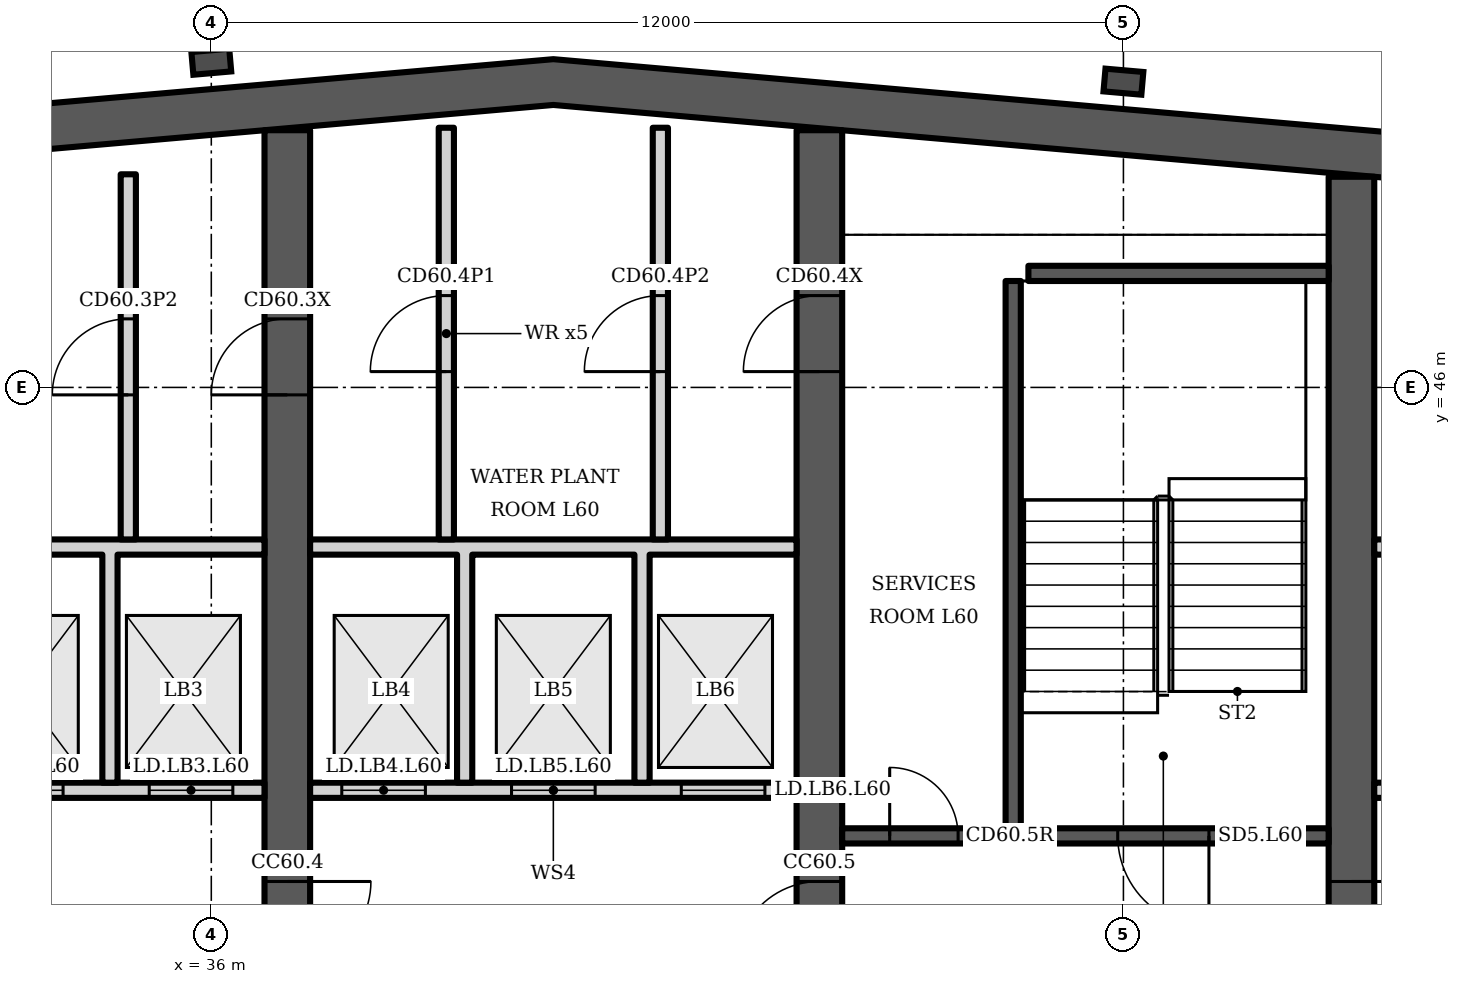
"""IFC4 building model, lengths in metres.
Left out: names, types, materials, properties, quantities, classifications, styles, units other than length and angle.
Written with IfcOpenShell. Run it as: python <this file> out.ifc"""

import sys

from ifc_helpers import new_model, si_unit, direction, frame, frame_2d, origin, origin_2d, place, context, subcontext, project, spatial, polyline, rectangle, i_section, outline, extrude, element, fill, save


model = new_model("IFC4")
c1 = context("Model", 3, precision=1e-05, world=origin(), true_north=direction((0.0, 1.0)))
c2 = subcontext(c1, "Body", "Model", "MODEL_VIEW")
j1 = project(units=[si_unit("LENGTHUNIT", "METRE"), si_unit("PLANEANGLEUNIT", "RADIAN")], contexts=[c1])
p1 = place(None, origin())
s1 = spatial("IfcSite", under=j1, at=p1, CompositionType="ELEMENT")
p2 = place(p1, origin())
s2 = spatial("IfcBuilding", under=s1, at=p2, CompositionType="ELEMENT")
p3 = place(p2, frame((0.0, 0.0, 239.5)))
s3 = spatial("IfcBuildingStorey", under=s2, at=p3, CompositionType="ELEMENT", Elevation=239.5)
p4 = place(p3, origin())
e1 = element("IfcWall", 1, at=p4, inside=s3, PredefinedType="SHEAR", context=c2, shape_type="SweptSolid", body=[
    extrude(outline(polyline([(23.0, 48.185), (40.5, 49.716), (58.0, 48.185), (58.0, 48.787), (40.5, 50.318), (23.0, 48.787), (23.0, 48.185)])), origin(), (0.0, 0.0, 1.0), 3.6),
])
p5 = place(p3, frame((37.0, 34.6, 0.0), z_axis=(0.0, 0.0, 1.0), x_axis=(0.0, 1.0, 0.0)))
e2 = element("IfcWall", 2, at=p5, inside=s3, PredefinedType="SHEAR", context=c2, shape_type="SweptSolid", body=[
    extrude(rectangle(XDim=14.784, YDim=0.6, at=frame_2d((7.392, 0.0))), origin(), (0.0, 0.0, 1.0), 3.6),
])
p6 = place(p5, frame((11.302, 0.0, 0.0)))
e3 = element("IfcOpeningElement", 3, at=p6, cuts=e2, PredefinedType="OPENING", context=c2, shape_type="SweptSolid", body=[
    extrude(rectangle(XDim=1.0, YDim=2.1, at=frame_2d((0.5, 1.05))), frame((0.0, 0.31, 0.0), z_axis=(0.0, -1.0, 0.0), x_axis=(1.0, 0.0, 0.0)), (0.0, 0.0, 1.0), 0.62),
])
p7 = place(p5, frame((3.8, 0.0, 0.0)))
e4 = element("IfcOpeningElement", 4, at=p7, cuts=e2, PredefinedType="OPENING", context=c2, shape_type="SweptSolid", body=[
    extrude(rectangle(XDim=1.1, YDim=2.1, at=frame_2d((0.55, 1.05))), frame((0.0, 0.31, 0.0), z_axis=(0.0, -1.0, 0.0), x_axis=(1.0, 0.0, 0.0)), (0.0, 0.0, 1.0), 0.62),
])
p8 = place(p3, frame((44.0, 34.6, 0.0), z_axis=(0.0, 0.0, 1.0), x_axis=(0.0, 1.0, 0.0)))
e5 = element("IfcWall", 5, at=p8, inside=s3, PredefinedType="SHEAR", context=c2, shape_type="SweptSolid", body=[
    extrude(rectangle(XDim=14.784, YDim=0.6, at=frame_2d((7.392, 0.0))), origin(), (0.0, 0.0, 1.0), 3.6),
])
p9 = place(p8, frame((11.608, 0.0, 0.0)))
e6 = element("IfcOpeningElement", 6, at=p9, cuts=e5, PredefinedType="OPENING", context=c2, shape_type="SweptSolid", body=[
    extrude(rectangle(XDim=1.0, YDim=2.1, at=frame_2d((0.5, 1.05))), frame((0.0, 0.31, 0.0), z_axis=(0.0, -1.0, 0.0), x_axis=(1.0, 0.0, 0.0)), (0.0, 0.0, 1.0), 0.62),
])
p10 = place(p8, frame((3.8, 0.0, 0.0)))
e7 = element("IfcOpeningElement", 7, at=p10, cuts=e5, PredefinedType="OPENING", context=c2, shape_type="SweptSolid", body=[
    extrude(rectangle(XDim=1.1, YDim=2.1, at=frame_2d((0.55, 1.05))), frame((0.0, 0.31, 0.0), z_axis=(0.0, -1.0, 0.0), x_axis=(1.0, 0.0, 0.0)), (0.0, 0.0, 1.0), 0.62),
])
p11 = place(p3, frame((51.0, 34.6, 0.0), z_axis=(0.0, 0.0, 1.0), x_axis=(0.0, 1.0, 0.0)))
e8 = element("IfcWall", 8, at=p11, inside=s3, PredefinedType="SHEAR", context=c2, shape_type="SweptSolid", body=[
    extrude(rectangle(XDim=14.171, YDim=0.6, at=frame_2d((7.085, 0.0))), origin(), (0.0, 0.0, 1.0), 3.6),
])
p12 = place(p11, frame((3.8, 0.0, 0.0)))
e9 = element("IfcOpeningElement", 9, at=p12, cuts=e8, PredefinedType="OPENING", context=c2, shape_type="SweptSolid", body=[
    extrude(rectangle(XDim=1.1, YDim=2.1, at=frame_2d((0.55, 1.05))), frame((0.0, 0.31, 0.0), z_axis=(0.0, -1.0, 0.0), x_axis=(1.0, 0.0, 0.0)), (0.0, 0.0, 1.0), 0.62),
])
for number, where, z_axis, x_axis in (
    (10, (36.0, 50.285, 0.0), (0.0, 0.0, 1.0), (-0.087, 0.996, 0.0)),
    (11, (48.0, 50.022, 0.0), (0.0, 0.0, 1.0), (0.087, 0.996, 0.0)),
):
    element("IfcColumn", number, at=place(p3, frame(where, z_axis=z_axis, x_axis=x_axis)), inside=s3, PredefinedType="COLUMN", context=c2, shape_type="SweptSolid", body=[
        extrude(i_section(OverallWidth=0.3, OverallDepth=0.5, WebThickness=0.014, FlangeThickness=0.028, FilletRadius=0.027, at=origin_2d()), origin(), (0.0, 0.0, 1.0), 3.6),
    ])
p13 = place(p3, frame((30.3, 40.7, 0.0), z_axis=(0.0, 0.0, 1.0), x_axis=(1.0, 0.0, 0.0)))
e12 = element("IfcWall", 12, at=p13, inside=s3, PredefinedType="PARTITIONING", context=c2, shape_type="SweptSolid", body=[
    extrude(rectangle(XDim=6.4, YDim=0.2, at=frame_2d((3.2, 0.0))), origin(), (0.0, 0.0, 1.0), 3.2),
])
p14 = place(p13, frame((0.417, 0.0, 0.0)))
e13 = element("IfcOpeningElement", 13, at=p14, cuts=e12, PredefinedType="OPENING", context=c2, shape_type="SweptSolid", body=[
    extrude(rectangle(XDim=1.1, YDim=2.1, at=frame_2d((0.55, 1.05))), frame((0.0, 0.11, 0.0), z_axis=(0.0, -1.0, 0.0), x_axis=(1.0, 0.0, 0.0)), (0.0, 0.0, 1.0), 0.22),
])
p15 = place(p13, frame((2.65, 0.0, 0.0)))
e14 = element("IfcOpeningElement", 14, at=p15, cuts=e12, PredefinedType="OPENING", context=c2, shape_type="SweptSolid", body=[
    extrude(rectangle(XDim=1.1, YDim=2.1, at=frame_2d((0.55, 1.05))), frame((0.0, 0.11, 0.0), z_axis=(0.0, -1.0, 0.0), x_axis=(1.0, 0.0, 0.0)), (0.0, 0.0, 1.0), 0.22),
])
p16 = place(p13, frame((4.883, 0.0, 0.0)))
e15 = element("IfcOpeningElement", 15, at=p16, cuts=e12, PredefinedType="OPENING", context=c2, shape_type="SweptSolid", body=[
    extrude(rectangle(XDim=1.1, YDim=2.1, at=frame_2d((0.55, 1.05))), frame((0.0, 0.11, 0.0), z_axis=(0.0, -1.0, 0.0), x_axis=(1.0, 0.0, 0.0)), (0.0, 0.0, 1.0), 0.22),
])
p17 = place(p3, frame((0.0, 0.0, -0.0)))
e16 = element("IfcWall", 16, at=p17, inside=s3, PredefinedType="PARTITIONING", context=c2, shape_type="SweptSolid", body=[
    extrude(outline(polyline([(32.433, 40.8), (32.233, 40.8), (32.233, 43.8), (30.3, 43.8), (30.3, 44.0), (36.7, 44.0), (36.7, 43.8), (34.767, 43.8), (34.767, 40.8), (34.567, 40.8), (34.567, 43.8), (32.433, 43.8), (32.433, 40.8)])), origin(), (0.0, 0.0, 1.0), 3.2),
])
p18 = place(p3, frame((34.908, 44.0, 0.0), z_axis=(0.0, 0.0, 1.0), x_axis=(0.0, 1.0, 0.0)))
e17 = element("IfcWall", 17, at=p18, inside=s3, PredefinedType="PARTITIONING", context=c2, shape_type="SweptSolid", body=[
    extrude(rectangle(XDim=4.804, YDim=0.2, at=frame_2d((2.402, 0.0))), origin(), (0.0, 0.0, 1.0), 3.2),
])
p19 = place(p18, frame((1.902, 0.0, 0.0)))
e18 = element("IfcOpeningElement", 18, at=p19, cuts=e17, PredefinedType="OPENING", context=c2, shape_type="SweptSolid", body=[
    extrude(rectangle(XDim=1.0, YDim=2.1, at=frame_2d((0.5, 1.05))), frame((0.0, 0.11, 0.0), z_axis=(0.0, -1.0, 0.0), x_axis=(1.0, 0.0, 0.0)), (0.0, 0.0, 1.0), 0.22),
])
p20 = place(p3, frame((37.3, 40.7, 0.0), z_axis=(0.0, 0.0, 1.0), x_axis=(1.0, 0.0, 0.0)))
e19 = element("IfcWall", 19, at=p20, inside=s3, PredefinedType="PARTITIONING", context=c2, shape_type="SweptSolid", body=[
    extrude(rectangle(XDim=6.4, YDim=0.2, at=frame_2d((3.2, 0.0))), origin(), (0.0, 0.0, 1.0), 3.2),
])
p21 = place(p20, frame((0.417, 0.0, 0.0)))
e20 = element("IfcOpeningElement", 20, at=p21, cuts=e19, PredefinedType="OPENING", context=c2, shape_type="SweptSolid", body=[
    extrude(rectangle(XDim=1.1, YDim=2.1, at=frame_2d((0.55, 1.05))), frame((0.0, 0.11, 0.0), z_axis=(0.0, -1.0, 0.0), x_axis=(1.0, 0.0, 0.0)), (0.0, 0.0, 1.0), 0.22),
])
p22 = place(p20, frame((2.65, 0.0, 0.0)))
e21 = element("IfcOpeningElement", 21, at=p22, cuts=e19, PredefinedType="OPENING", context=c2, shape_type="SweptSolid", body=[
    extrude(rectangle(XDim=1.1, YDim=2.1, at=frame_2d((0.55, 1.05))), frame((0.0, 0.11, 0.0), z_axis=(0.0, -1.0, 0.0), x_axis=(1.0, 0.0, 0.0)), (0.0, 0.0, 1.0), 0.22),
])
p23 = place(p20, frame((4.883, 0.0, 0.0)))
e22 = element("IfcOpeningElement", 22, at=p23, cuts=e19, PredefinedType="OPENING", context=c2, shape_type="SweptSolid", body=[
    extrude(rectangle(XDim=1.1, YDim=2.1, at=frame_2d((0.55, 1.05))), frame((0.0, 0.11, 0.0), z_axis=(0.0, -1.0, 0.0), x_axis=(1.0, 0.0, 0.0)), (0.0, 0.0, 1.0), 0.22),
])
p24 = place(p3, frame((0.0, 0.0, -0.0)))
e23 = element("IfcWall", 23, at=p24, inside=s3, PredefinedType="PARTITIONING", context=c2, shape_type="SweptSolid", body=[
    extrude(outline(polyline([(39.433, 40.8), (39.233, 40.8), (39.233, 43.8), (37.3, 43.8), (37.3, 44.0), (43.7, 44.0), (43.7, 43.8), (41.767, 43.8), (41.767, 40.8), (41.567, 40.8), (41.567, 43.8), (39.433, 43.8), (39.433, 40.8)])), origin(), (0.0, 0.0, 1.0), 3.2),
])
p25 = place(p3, frame((39.092, 44.0, 0.0), z_axis=(0.0, 0.0, 1.0), x_axis=(0.0, 1.0, 0.0)))
e24 = element("IfcWall", 24, at=p25, inside=s3, PredefinedType="PARTITIONING", context=c2, shape_type="SweptSolid", body=[
    extrude(rectangle(XDim=5.416, YDim=0.2, at=frame_2d((2.708, 0.0))), origin(), (0.0, 0.0, 1.0), 3.2),
])
p26 = place(p25, frame((2.208, 0.0, 0.0)))
e25 = element("IfcOpeningElement", 25, at=p26, cuts=e24, PredefinedType="OPENING", context=c2, shape_type="SweptSolid", body=[
    extrude(rectangle(XDim=1.0, YDim=2.1, at=frame_2d((0.5, 1.05))), frame((0.0, 0.11, 0.0), z_axis=(0.0, -1.0, 0.0), x_axis=(1.0, 0.0, 0.0)), (0.0, 0.0, 1.0), 0.22),
])
p27 = place(p3, frame((41.908, 44.0, 0.0), z_axis=(0.0, 0.0, 1.0), x_axis=(0.0, 1.0, 0.0)))
e26 = element("IfcWall", 26, at=p27, inside=s3, PredefinedType="PARTITIONING", context=c2, shape_type="SweptSolid", body=[
    extrude(rectangle(XDim=5.416, YDim=0.2, at=frame_2d((2.708, 0.0))), origin(), (0.0, 0.0, 1.0), 3.2),
])
p28 = place(p27, frame((2.208, 0.0, 0.0)))
e27 = element("IfcOpeningElement", 27, at=p28, cuts=e26, PredefinedType="OPENING", context=c2, shape_type="SweptSolid", body=[
    extrude(rectangle(XDim=1.0, YDim=2.1, at=frame_2d((0.5, 1.05))), frame((0.0, 0.11, 0.0), z_axis=(0.0, -1.0, 0.0), x_axis=(1.0, 0.0, 0.0)), (0.0, 0.0, 1.0), 0.22),
])
p29 = place(p3, frame((44.3, 40.1, 0.0), z_axis=(0.0, 0.0, 1.0), x_axis=(1.0, 0.0, 0.0)))
e28 = element("IfcWall", 28, at=p29, inside=s3, PredefinedType="SHEAR", context=c2, shape_type="SweptSolid", body=[
    extrude(rectangle(XDim=6.4, YDim=0.2, at=frame_2d((3.2, 0.0))), origin(), (0.0, 0.0, 1.0), 3.2),
])
p30 = place(p29, frame((3.625, 0.0, 0.0)))
e29 = element("IfcOpeningElement", 29, at=p30, cuts=e28, PredefinedType="OPENING", context=c2, shape_type="SweptSolid", body=[
    extrude(rectangle(XDim=1.2, YDim=2.1, at=frame_2d((0.6, 1.05))), frame((0.0, 0.11, 0.0), z_axis=(0.0, -1.0, 0.0), x_axis=(1.0, 0.0, 0.0)), (0.0, 0.0, 1.0), 0.22),
])
p31 = place(p29, frame((0.625, 0.0, 0.0)))
e30 = element("IfcOpeningElement", 30, at=p31, cuts=e28, PredefinedType="OPENING", context=c2, shape_type="SweptSolid", body=[
    extrude(rectangle(XDim=0.9, YDim=2.1, at=frame_2d((0.45, 1.05))), frame((0.0, 0.11, 0.0), z_axis=(0.0, -1.0, 0.0), x_axis=(1.0, 0.0, 0.0)), (0.0, 0.0, 1.0), 0.22),
])
p32 = place(p3, frame((46.55, 40.2, 0.0), z_axis=(0.0, 0.0, 1.0), x_axis=(0.0, 1.0, 0.0)))
e31 = element("IfcWall", 31, at=p32, inside=s3, PredefinedType="SHEAR", context=c2, shape_type="SweptSolid", body=[
    extrude(rectangle(XDim=7.2, YDim=0.2, at=frame_2d((3.6, 0.0))), origin(), (0.0, 0.0, 1.0), 3.2),
])
p33 = place(p3, frame((46.75, 47.5, 0.0), z_axis=(0.0, 0.0, 1.0), x_axis=(1.0, 0.0, 0.0)))
e32 = element("IfcWall", 32, at=p33, inside=s3, PredefinedType="SHEAR", context=c2, shape_type="SweptSolid", body=[
    extrude(rectangle(XDim=3.95, YDim=0.2, at=frame_2d((1.975, 0.0))), origin(), (0.0, 0.0, 1.0), 3.2),
])
p34 = place(p3, frame((51.3, 40.7, 0.0), z_axis=(0.0, 0.0, 1.0), x_axis=(1.0, 0.0, 0.0)))
e33 = element("IfcWall", 33, at=p34, inside=s3, PredefinedType="PARTITIONING", context=c2, shape_type="SweptSolid", body=[
    extrude(rectangle(XDim=6.1, YDim=0.2, at=frame_2d((3.05, 0.0))), origin(), (0.0, 0.0, 1.0), 3.2),
])
p35 = place(p34, frame((0.417, 0.0, 0.0)))
e34 = element("IfcOpeningElement", 34, at=p35, cuts=e33, PredefinedType="OPENING", context=c2, shape_type="SweptSolid", body=[
    extrude(rectangle(XDim=1.1, YDim=2.1, at=frame_2d((0.55, 1.05))), frame((0.0, 0.11, 0.0), z_axis=(0.0, -1.0, 0.0), x_axis=(1.0, 0.0, 0.0)), (0.0, 0.0, 1.0), 0.22),
])
p36 = place(p34, frame((3.617, 0.0, 0.0)))
e35 = element("IfcOpeningElement", 35, at=p36, cuts=e33, PredefinedType="OPENING", context=c2, shape_type="SweptSolid", body=[
    extrude(rectangle(XDim=1.0, YDim=2.1, at=frame_2d((0.5, 1.05))), frame((0.0, 0.11, 0.0), z_axis=(0.0, -1.0, 0.0), x_axis=(1.0, 0.0, 0.0)), (0.0, 0.0, 1.0), 0.22),
])
p37 = place(p3, frame((51.3, 43.9, 0.0), z_axis=(0.0, 0.0, 1.0), x_axis=(1.0, 0.0, 0.0)))
e36 = element("IfcWall", 36, at=p37, inside=s3, PredefinedType="PARTITIONING", context=c2, shape_type="SweptSolid", body=[
    extrude(rectangle(XDim=6.1, YDim=0.2, at=frame_2d((3.05, 0.0))), origin(), (0.0, 0.0, 1.0), 3.2),
])
p38 = place(p37, frame((2.817, 0.0, 0.0)))
e37 = element("IfcOpeningElement", 37, at=p38, cuts=e36, PredefinedType="OPENING", context=c2, shape_type="SweptSolid", body=[
    extrude(rectangle(XDim=1.0, YDim=2.1, at=frame_2d((0.5, 1.05))), frame((0.0, 0.11, 0.0), z_axis=(0.0, -1.0, 0.0), x_axis=(1.0, 0.0, 0.0)), (0.0, 0.0, 1.0), 0.22),
])
p39 = place(p37, frame((4.8, 0.0, 0.0)))
e38 = element("IfcOpeningElement", 38, at=p39, cuts=e36, PredefinedType="OPENING", context=c2, shape_type="SweptSolid", body=[
    extrude(rectangle(XDim=1.0, YDim=2.1, at=frame_2d((0.5, 1.05))), frame((0.0, 0.11, 0.0), z_axis=(0.0, -1.0, 0.0), x_axis=(1.0, 0.0, 0.0)), (0.0, 0.0, 1.0), 0.22),
])
p40 = place(p15, origin())
e39 = element("IfcDoor", 39, at=p40, inside=s3, OperationType="DOUBLE_DOOR_SLIDING", PredefinedType="DOOR", context=c2, shape_type="SweptSolid", body=[
    extrude(rectangle(XDim=1.1, YDim=2.1, at=frame_2d((0.55, 1.05))), frame((0.0, 0.025, 0.0), z_axis=(0.0, -1.0, 0.0), x_axis=(1.0, 0.0, 0.0)), (0.0, 0.0, 1.0), 0.05),
])
fill(e14, e39)
p41 = place(p16, origin())
e40 = element("IfcDoor", 40, at=p41, inside=s3, OperationType="DOUBLE_DOOR_SLIDING", PredefinedType="DOOR", context=c2, shape_type="SweptSolid", body=[
    extrude(rectangle(XDim=1.1, YDim=2.1, at=frame_2d((0.55, 1.05))), frame((0.0, 0.025, 0.0), z_axis=(0.0, -1.0, 0.0), x_axis=(1.0, 0.0, 0.0)), (0.0, 0.0, 1.0), 0.05),
])
fill(e15, e40)
p42 = place(p19, origin())
e41 = element("IfcDoor", 41, at=p42, inside=s3, OperationType="SINGLE_SWING_LEFT", PredefinedType="DOOR", context=c2, shape_type="SweptSolid", body=[
    extrude(rectangle(XDim=1.0, YDim=2.1, at=frame_2d((0.5, 1.05))), frame((0.0, 0.025, 0.0), z_axis=(0.0, -1.0, 0.0), x_axis=(1.0, 0.0, 0.0)), (0.0, 0.0, 1.0), 0.05),
])
fill(e18, e41)
p43 = place(p6, origin())
e42 = element("IfcDoor", 42, at=p43, inside=s3, OperationType="SINGLE_SWING_LEFT", PredefinedType="DOOR", context=c2, shape_type="SweptSolid", body=[
    extrude(rectangle(XDim=1.0, YDim=2.1, at=frame_2d((0.5, 1.05))), frame((0.0, 0.025, 0.0), z_axis=(0.0, -1.0, 0.0), x_axis=(1.0, 0.0, 0.0)), (0.0, 0.0, 1.0), 0.05),
])
fill(e3, e42)
p44 = place(p21, origin())
e43 = element("IfcDoor", 43, at=p44, inside=s3, OperationType="DOUBLE_DOOR_SLIDING", PredefinedType="DOOR", context=c2, shape_type="SweptSolid", body=[
    extrude(rectangle(XDim=1.1, YDim=2.1, at=frame_2d((0.55, 1.05))), frame((0.0, 0.025, 0.0), z_axis=(0.0, -1.0, 0.0), x_axis=(1.0, 0.0, 0.0)), (0.0, 0.0, 1.0), 0.05),
])
fill(e20, e43)
p45 = place(p22, origin())
e44 = element("IfcDoor", 44, at=p45, inside=s3, OperationType="DOUBLE_DOOR_SLIDING", PredefinedType="DOOR", context=c2, shape_type="SweptSolid", body=[
    extrude(rectangle(XDim=1.1, YDim=2.1, at=frame_2d((0.55, 1.05))), frame((0.0, 0.025, 0.0), z_axis=(0.0, -1.0, 0.0), x_axis=(1.0, 0.0, 0.0)), (0.0, 0.0, 1.0), 0.05),
])
fill(e21, e44)
p46 = place(p23, origin())
e45 = element("IfcDoor", 45, at=p46, inside=s3, OperationType="DOUBLE_DOOR_SLIDING", PredefinedType="DOOR", context=c2, shape_type="SweptSolid", body=[
    extrude(rectangle(XDim=1.1, YDim=2.1, at=frame_2d((0.55, 1.05))), frame((0.0, 0.025, 0.0), z_axis=(0.0, -1.0, 0.0), x_axis=(1.0, 0.0, 0.0)), (0.0, 0.0, 1.0), 0.05),
])
fill(e22, e45)
p47 = place(p26, origin())
e46 = element("IfcDoor", 46, at=p47, inside=s3, OperationType="SINGLE_SWING_LEFT", PredefinedType="DOOR", context=c2, shape_type="SweptSolid", body=[
    extrude(rectangle(XDim=1.0, YDim=2.1, at=frame_2d((0.5, 1.05))), frame((0.0, 0.025, 0.0), z_axis=(0.0, -1.0, 0.0), x_axis=(1.0, 0.0, 0.0)), (0.0, 0.0, 1.0), 0.05),
])
fill(e25, e46)
p48 = place(p28, origin())
e47 = element("IfcDoor", 47, at=p48, inside=s3, OperationType="SINGLE_SWING_LEFT", PredefinedType="DOOR", context=c2, shape_type="SweptSolid", body=[
    extrude(rectangle(XDim=1.0, YDim=2.1, at=frame_2d((0.5, 1.05))), frame((0.0, 0.025, 0.0), z_axis=(0.0, -1.0, 0.0), x_axis=(1.0, 0.0, 0.0)), (0.0, 0.0, 1.0), 0.05),
])
fill(e27, e47)
p49 = place(p9, origin())
e48 = element("IfcDoor", 48, at=p49, inside=s3, OperationType="SINGLE_SWING_LEFT", PredefinedType="DOOR", context=c2, shape_type="SweptSolid", body=[
    extrude(rectangle(XDim=1.0, YDim=2.1, at=frame_2d((0.5, 1.05))), frame((0.0, 0.025, 0.0), z_axis=(0.0, -1.0, 0.0), x_axis=(1.0, 0.0, 0.0)), (0.0, 0.0, 1.0), 0.05),
])
fill(e6, e48)
p50 = place(p30, origin())
e49 = element("IfcDoor", 49, at=p50, inside=s3, OperationType="SINGLE_SWING_RIGHT", PredefinedType="DOOR", context=c2, shape_type="SweptSolid", body=[
    extrude(rectangle(XDim=1.2, YDim=2.1, at=frame_2d((0.6, 1.05))), frame((0.0, 0.025, 0.0), z_axis=(0.0, -1.0, 0.0), x_axis=(1.0, 0.0, 0.0)), (0.0, 0.0, 1.0), 0.05),
])
fill(e29, e49)
p51 = place(p31, origin())
e50 = element("IfcDoor", 50, at=p51, inside=s3, OperationType="SINGLE_SWING_LEFT", PredefinedType="DOOR", context=c2, shape_type="SweptSolid", body=[
    extrude(rectangle(XDim=0.9, YDim=2.1, at=frame_2d((0.45, 1.05))), frame((0.0, 0.025, 0.0), z_axis=(0.0, -1.0, 0.0), x_axis=(1.0, 0.0, 0.0)), (0.0, 0.0, 1.0), 0.05),
])
fill(e30, e50)
p52 = place(p7, origin())
e51 = element("IfcDoor", 51, at=p52, inside=s3, OperationType="SINGLE_SWING_RIGHT", PredefinedType="DOOR", context=c2, shape_type="SweptSolid", body=[
    extrude(rectangle(XDim=1.1, YDim=2.1, at=frame_2d((0.55, 1.05))), frame((0.0, 0.025, 0.0), z_axis=(0.0, -1.0, 0.0), x_axis=(1.0, 0.0, 0.0)), (0.0, 0.0, 1.0), 0.05),
])
fill(e4, e51)
p53 = place(p10, origin())
e52 = element("IfcDoor", 52, at=p53, inside=s3, OperationType="SINGLE_SWING_LEFT", PredefinedType="DOOR", context=c2, shape_type="SweptSolid", body=[
    extrude(rectangle(XDim=1.1, YDim=2.1, at=frame_2d((0.55, 1.05))), frame((0.0, 0.025, 0.0), z_axis=(0.0, -1.0, 0.0), x_axis=(1.0, 0.0, 0.0)), (0.0, 0.0, 1.0), 0.05),
])
fill(e7, e52)
p54 = place(p12, origin())
e53 = element("IfcDoor", 53, at=p54, inside=s3, OperationType="SINGLE_SWING_RIGHT", PredefinedType="DOOR", context=c2, shape_type="SweptSolid", body=[
    extrude(rectangle(XDim=1.1, YDim=2.1, at=frame_2d((0.55, 1.05))), frame((0.0, 0.025, 0.0), z_axis=(0.0, -1.0, 0.0), x_axis=(1.0, 0.0, 0.0)), (0.0, 0.0, 1.0), 0.05),
])
fill(e9, e53)
save(model, sys.argv[1])
